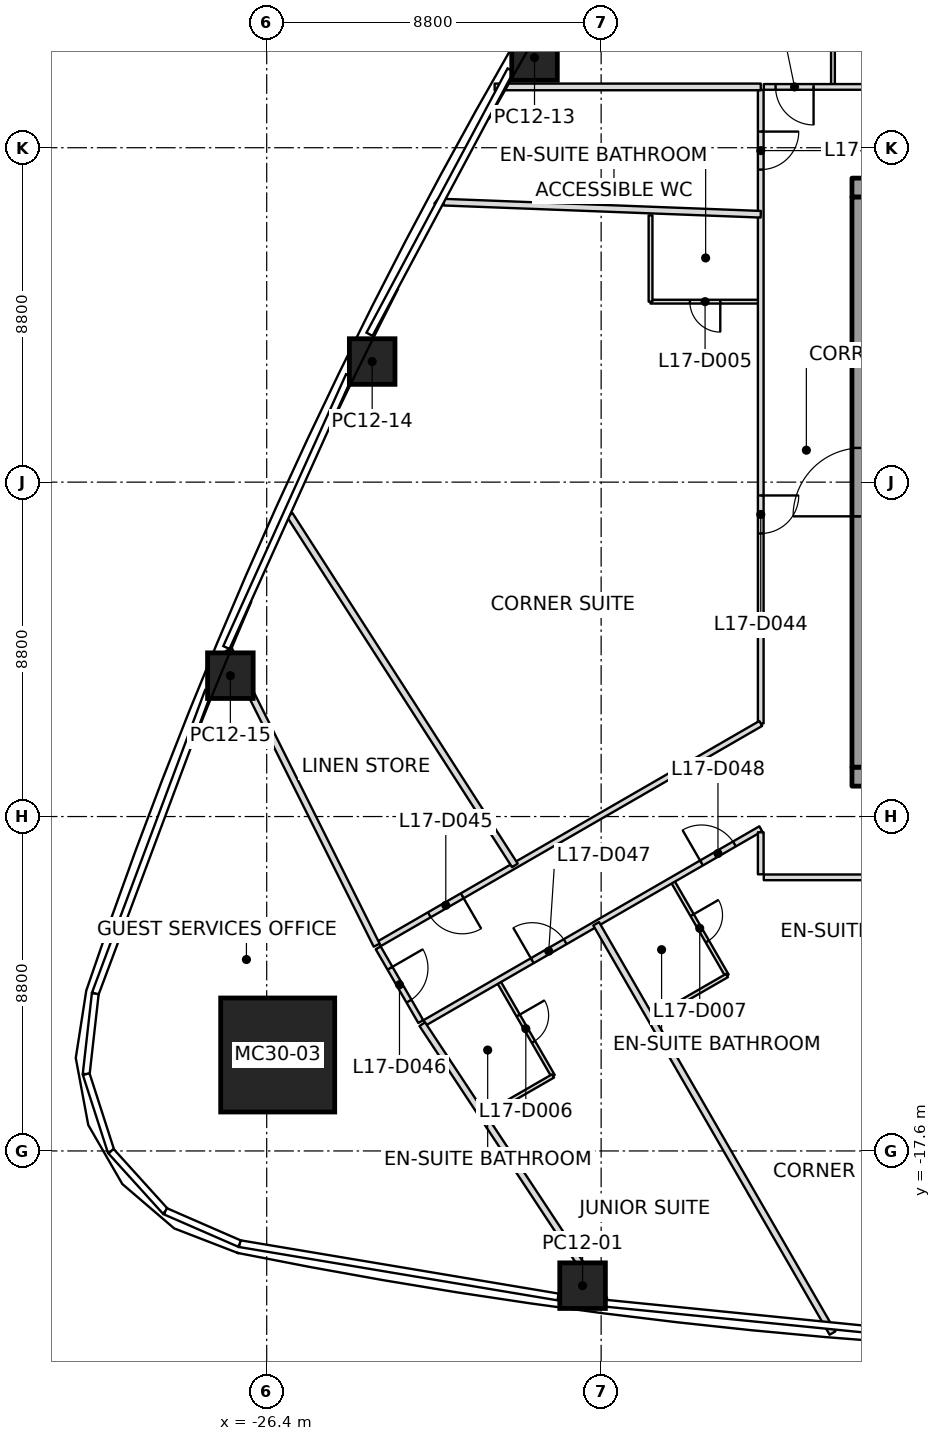
"""IFC4 building model, lengths in metres.
Left out: names, types, materials, properties, quantities, classifications, styles, units other than length and angle.
Written with IfcOpenShell. Run it as: python <this file> out.ifc"""

import sys

from ifc_helpers import new_model, si_unit, direction, frame, frame_2d, origin, origin_2d, place, context, subcontext, project, spatial, rectangle, extrude, element, fill, save


model = new_model("IFC4")
c1 = context("Model", 3, precision=1e-05, world=origin(), true_north=direction((0.0, 1.0)))
c2 = subcontext(c1, "Body", "Model", "MODEL_VIEW")
j1 = project(units=[si_unit("LENGTHUNIT", "METRE"), si_unit("PLANEANGLEUNIT", "RADIAN")], contexts=[c1])
p1 = place(None, origin())
s1 = spatial("IfcSite", under=j1, at=p1, CompositionType="ELEMENT")
p2 = place(p1, origin())
s2 = spatial("IfcBuilding", under=s1, at=p2, CompositionType="ELEMENT")
p3 = place(p2, frame((0.0, 0.0, 85.0)))
s3 = spatial("IfcBuildingStorey", under=s2, at=p3, CompositionType="ELEMENT", Elevation=85.0)
p4 = place(p3, frame((-26.111, -15.075, 0.0), z_axis=(0.030466109479, 0.017607037296, 0.999380712447), x_axis=(0.999535800346, -0.000536667047, -0.03046138236)))
e1 = element("IfcColumn", 1, at=p4, inside=s3, PredefinedType="COLUMN", context=c2, shape_type="SweptSolid", body=[
    extrude(rectangle(XDim=3.0, YDim=3.0, at=origin_2d()), origin(), (0.0, 0.0, 1.0), 3.702),
])
p5 = place(p3, frame((-18.088, -21.145, 0.0), z_axis=(0.019196808933, 0.011346567479, 0.99975133805), x_axis=(-0.991022032909, 0.132545119301, 0.017524886246)))
e2 = element("IfcColumn", 2, at=p5, inside=s3, PredefinedType="COLUMN", context=c2, shape_type="SweptSolid", body=[
    extrude(rectangle(XDim=1.2, YDim=1.2, at=origin_2d()), origin(), (0.0, 0.0, 1.0), 3.701),
])
p6 = place(p3, frame((-19.353, 11.174, 0.0), z_axis=(0.010688725148, -0.006202099777, 0.999923639641), x_axis=(0.499971436973, 0.8660418936, 2.7223042e-05)))
e3 = element("IfcColumn", 3, at=p6, inside=s3, PredefinedType="COLUMN", context=c2, shape_type="SweptSolid", body=[
    extrude(rectangle(XDim=1.2, YDim=1.2, at=origin_2d()), origin(), (0.0, 0.0, 1.0), 3.7),
])
p7 = place(p3, frame((-23.625, 3.173, 0.0), z_axis=(0.015306647086, 0.002243215521, 0.999880330109), x_axis=(0.441416548543, 0.897259444475, -0.008770403192)))
e4 = element("IfcColumn", 4, at=p7, inside=s3, PredefinedType="COLUMN", context=c2, shape_type="SweptSolid", body=[
    extrude(rectangle(XDim=1.2, YDim=1.2, at=origin_2d()), origin(), (0.0, 0.0, 1.0), 3.7),
])
p8 = place(p3, frame((-27.356, -5.093, 0.0), z_axis=(0.019394711647, 0.011016723963, 0.999751207528), x_axis=(0.380922870909, 0.924439738962, -0.017576559581)))
e5 = element("IfcColumn", 5, at=p8, inside=s3, PredefinedType="COLUMN", context=c2, shape_type="SweptSolid", body=[
    extrude(rectangle(XDim=1.2, YDim=1.2, at=origin_2d()), origin(), (0.0, 0.0, 1.0), 3.701),
])
p9 = place(p3, frame((-11.0, -7.75, 0.0), z_axis=(0.0, 0.0, 1.0), x_axis=(1.0, 0.0, 0.0)))
e6 = element("IfcWall", 6, at=p9, inside=s3, PredefinedType="SHEAR", context=c2, shape_type="SweptSolid", body=[
    extrude(rectangle(XDim=22.0, YDim=0.5, at=frame_2d((11.0, 0.0))), origin(), (0.0, 0.0, 1.0), 3.7),
])
p10 = place(p9, frame((10.45, 0.0, 0.0)))
e7 = element("IfcOpeningElement", 7, at=p10, cuts=e6, PredefinedType="OPENING", context=c2, shape_type="SweptSolid", body=[
    extrude(rectangle(XDim=1.1, YDim=2.1, at=frame_2d((0.55, 1.05))), frame((0.0, 0.25, 0.0), z_axis=(0.0, -1.0, 0.0), x_axis=(1.0, 0.0, 0.0)), (0.0, 0.0, 1.0), 0.5),
])
p11 = place(p3, frame((-11.0, 7.75, 0.0), z_axis=(0.0, 0.0, 1.0), x_axis=(1.0, 0.0, 0.0)))
e8 = element("IfcWall", 8, at=p11, inside=s3, PredefinedType="SHEAR", context=c2, shape_type="SweptSolid", body=[
    extrude(rectangle(XDim=22.0, YDim=0.5, at=frame_2d((11.0, 0.0))), origin(), (0.0, 0.0, 1.0), 3.7),
])
p12 = place(p11, frame((10.45, 0.0, 0.0)))
e9 = element("IfcOpeningElement", 9, at=p12, cuts=e8, PredefinedType="OPENING", context=c2, shape_type="SweptSolid", body=[
    extrude(rectangle(XDim=1.1, YDim=2.1, at=frame_2d((0.55, 1.05))), frame((0.0, 0.25, 0.0), z_axis=(0.0, -1.0, 0.0), x_axis=(1.0, 0.0, 0.0)), (0.0, 0.0, 1.0), 0.5),
])
p13 = place(p3, frame((-10.75, -7.5, 0.0), z_axis=(0.0, 0.0, 1.0), x_axis=(0.0, 1.0, 0.0)))
e10 = element("IfcWall", 10, at=p13, inside=s3, PredefinedType="SHEAR", context=c2, shape_type="SweptSolid", body=[
    extrude(rectangle(XDim=15.0, YDim=0.5, at=frame_2d((7.5, 0.0))), origin(), (0.0, 0.0, 1.0), 3.7),
])
p14 = place(p13, frame((6.6, 0.0, 0.0)))
e11 = element("IfcOpeningElement", 11, at=p14, cuts=e10, PredefinedType="OPENING", context=c2, shape_type="SweptSolid", body=[
    extrude(rectangle(XDim=1.8, YDim=2.1, at=frame_2d((0.9, 1.05))), frame((0.0, 0.25, 0.0), z_axis=(0.0, -1.0, 0.0), x_axis=(1.0, 0.0, 0.0)), (0.0, 0.0, 1.0), 0.5),
])
p15 = place(p3, frame((-23.506, -12.186, 0.0), z_axis=(0.0, 0.0, 1.0), x_axis=(-0.447247279783, 0.894410348066, 0.0)))
e12 = element("IfcWall", 12, at=p15, inside=s3, PredefinedType="PARTITIONING", context=c2, shape_type="SweptSolid", body=[
    extrude(rectangle(XDim=8.698, YDim=0.175, at=frame_2d((4.349, 0.0))), origin(), (0.0, 0.0, 1.0), 3.0),
])
p16 = place(p3, frame((-19.869, -10.086, 0.0), z_axis=(0.0, 0.0, 1.0), x_axis=(-0.540525739179, 0.841327478028, 0.0)))
e13 = element("IfcWall", 13, at=p16, inside=s3, PredefinedType="PARTITIONING", context=c2, shape_type="SweptSolid", body=[
    extrude(rectangle(XDim=10.964, YDim=0.175, at=frame_2d((5.482, 0.0))), origin(), (0.0, 0.0, 1.0), 2.934),
])
p17 = place(p3, frame((-17.514, -21.522, 0.0), z_axis=(0.0, 0.0, 1.0), x_axis=(-0.5509763379, 0.834520865571, 0.0)))
e14 = element("IfcWall", 14, at=p17, inside=s3, PredefinedType="PARTITIONING", context=c2, shape_type="SweptSolid", body=[
    extrude(rectangle(XDim=8.697, YDim=0.175, at=frame_2d((4.349, 0.0))), origin(), (0.0, 0.0, 1.0), 3.0),
])
p18 = place(p3, frame((-21.789, 7.281, 0.0), z_axis=(0.0, 0.0, 1.0), x_axis=(-0.768540956149, 0.639800592936, 0.0)))
e15 = element("IfcWall", 15, at=p18, inside=s3, PredefinedType="PARTITIONING", context=c2, shape_type="SweptSolid", body=[
    extrude(rectangle(XDim=0.188, YDim=0.175, at=frame_2d((0.094, 0.0))), origin(), (0.0, 0.0, 1.0), 3.0),
])
p19 = place(p3, frame((-21.739, 7.367, 0.0), z_axis=(0.0, 0.0, 1.0), x_axis=(0.999271981954, -0.038151095432, 0.0)))
e16 = element("IfcWall", 16, at=p19, inside=s3, PredefinedType="PARTITIONING", context=c2, shape_type="SweptSolid", body=[
    extrude(rectangle(XDim=8.345, YDim=0.175, at=frame_2d((4.172, 0.0))), origin(), (0.0, 0.0, 1.0), 2.934),
])
p20 = place(p3, frame((-13.4, 10.4, 0.0), z_axis=(0.0, 0.0, 1.0), x_axis=(-1.0, 0.0, 0.0)))
e17 = element("IfcWall", 17, at=p20, inside=s3, PredefinedType="PARTITIONING", context=c2, shape_type="SweptSolid", body=[
    extrude(rectangle(XDim=7.002, YDim=0.175, at=frame_2d((3.501, 0.0))), origin(), (0.0, 0.0, 1.0), 2.934),
])
p21 = place(p3, frame((-17.73, -11.622, 0.0), z_axis=(0.0, 0.0, 1.0), x_axis=(0.499981892896, -0.866035857673, 0.0)))
e18 = element("IfcWall", 18, at=p21, inside=s3, PredefinedType="PARTITIONING", context=c2, shape_type="SweptSolid", body=[
    extrude(rectangle(XDim=12.436, YDim=0.175, at=frame_2d((6.218, 0.0))), origin(), (0.0, 0.0, 1.0), 2.784),
])
p22 = place(p3, frame((-23.466, -12.255, 0.0), z_axis=(0.0, 0.0, 1.0), x_axis=(0.49994888933, -0.866054910533, 0.0)))
e19 = element("IfcWall", 19, at=p22, inside=s3, PredefinedType="PARTITIONING", context=c2, shape_type="SweptSolid", body=[
    extrude(rectangle(XDim=2.24, YDim=0.15, at=frame_2d((1.12, 0.0))), origin(), (0.0, 0.0, 1.0), 2.797),
])
p23 = place(p22, frame((0.62, 0.0, 0.0)))
e20 = element("IfcOpeningElement", 20, at=p23, cuts=e19, PredefinedType="OPENING", context=c2, shape_type="SweptSolid", body=[
    extrude(rectangle(XDim=1.0, YDim=2.1, at=frame_2d((0.5, 1.05))), frame((0.0, 0.075, 0.0), z_axis=(0.0, -1.0, 0.0), x_axis=(1.0, 0.0, 0.0)), (0.0, 0.0, 1.0), 0.15),
])
p24 = place(p3, frame((-13.4, 10.32, 0.0), z_axis=(0.0, 0.0, 1.0), x_axis=(0.0, -1.0, 0.0)))
e21 = element("IfcWall", 21, at=p24, inside=s3, PredefinedType="PARTITIONING", context=c2, shape_type="SweptSolid", body=[
    extrude(rectangle(XDim=16.671, YDim=0.15, at=frame_2d((8.335, 0.0))), origin(), (0.0, 0.0, 1.0), 2.947),
])
p25 = place(p24, frame((1.095, 0.0, 0.0)))
e22 = element("IfcOpeningElement", 22, at=p25, cuts=e21, PredefinedType="OPENING", context=c2, shape_type="SweptSolid", body=[
    extrude(rectangle(XDim=1.0, YDim=2.1, at=frame_2d((0.5, 1.05))), frame((0.0, 0.075, 0.0), z_axis=(0.0, -1.0, 0.0), x_axis=(1.0, 0.0, 0.0)), (0.0, 0.0, 1.0), 0.15),
])
p26 = place(p24, frame((10.671, 0.0, 0.0)))
e23 = element("IfcOpeningElement", 23, at=p26, cuts=e21, PredefinedType="OPENING", context=c2, shape_type="SweptSolid", body=[
    extrude(rectangle(XDim=1.0, YDim=2.1, at=frame_2d((0.5, 1.05))), frame((0.0, 0.075, 0.0), z_axis=(0.0, -1.0, 0.0), x_axis=(1.0, 0.0, 0.0)), (0.0, 0.0, 1.0), 0.15),
])
p27 = place(p3, frame((-13.4, -6.351, 0.0), z_axis=(0.0, 0.0, 1.0), x_axis=(-0.866025625133, -0.499999616612, 0.0)))
e24 = element("IfcWall", 24, at=p27, inside=s3, PredefinedType="PARTITIONING", context=c2, shape_type="SweptSolid", body=[
    extrude(rectangle(XDim=11.59, YDim=0.15, at=frame_2d((5.795, 0.0))), origin(), (0.0, 0.0, 1.0), 2.947),
])
p28 = place(p27, frame((9.07, 0.0, 0.0)))
e25 = element("IfcOpeningElement", 25, at=p28, cuts=e24, PredefinedType="OPENING", context=c2, shape_type="SweptSolid", body=[
    extrude(rectangle(XDim=1.0, YDim=2.1, at=frame_2d((0.5, 1.05))), frame((0.0, 0.075, 0.0), z_axis=(0.0, -1.0, 0.0), x_axis=(1.0, 0.0, 0.0)), (0.0, 0.0, 1.0), 0.15),
])
p29 = place(p3, frame((-22.237, -14.224, 0.0), z_axis=(0.0, 0.0, 1.0), x_axis=(0.866018645883, 0.500011704846, 0.0)))
e26 = element("IfcWall", 26, at=p29, inside=s3, PredefinedType="PARTITIONING", context=c2, shape_type="SweptSolid", body=[
    extrude(rectangle(XDim=10.204, YDim=0.15, at=frame_2d((5.102, 0.0))), origin(), (0.0, 0.0, 1.0), 2.797),
])
p30 = place(p29, frame((3.262, 0.0, 0.0)))
e27 = element("IfcOpeningElement", 27, at=p30, cuts=e26, PredefinedType="OPENING", context=c2, shape_type="SweptSolid", body=[
    extrude(rectangle(XDim=1.0, YDim=2.1, at=frame_2d((0.5, 1.05))), frame((0.0, 0.075, 0.0), z_axis=(0.0, -1.0, 0.0), x_axis=(1.0, 0.0, 0.0)), (0.0, 0.0, 1.0), 0.15),
])
p31 = place(p29, frame((8.404, 0.0, 0.0)))
e28 = element("IfcOpeningElement", 28, at=p31, cuts=e26, PredefinedType="OPENING", context=c2, shape_type="SweptSolid", body=[
    extrude(rectangle(XDim=1.0, YDim=2.1, at=frame_2d((0.5, 1.05))), frame((0.0, 0.075, 0.0), z_axis=(0.0, -1.0, 0.0), x_axis=(1.0, 0.0, 0.0)), (0.0, 0.0, 1.0), 0.15),
])
p32 = place(p3, frame((-13.4, -9.214, 0.0), z_axis=(0.0, 0.0, 1.0), x_axis=(0.0, -1.0, 0.0)))
e29 = element("IfcWall", 29, at=p32, inside=s3, PredefinedType="PARTITIONING", context=c2, shape_type="SweptSolid", body=[
    extrude(rectangle(XDim=1.106, YDim=0.15, at=frame_2d((0.553, 0.0))), origin(), (0.0, 0.0, 1.0), 2.797),
])
p33 = place(p3, frame((-13.32, -10.4, 0.0), z_axis=(0.0, 0.0, 1.0), x_axis=(1.0, 0.0, 0.0)))
e30 = element("IfcWall", 30, at=p33, inside=s3, PredefinedType="PARTITIONING", context=c2, shape_type="SweptSolid", body=[
    extrude(rectangle(XDim=26.64, YDim=0.15, at=frame_2d((13.32, 0.0))), origin(), (0.0, 0.0, 1.0), 2.797),
])
p34 = place(p33, frame((7.72, 0.0, 0.0)))
e31 = element("IfcOpeningElement", 31, at=p34, cuts=e30, PredefinedType="OPENING", context=c2, shape_type="SweptSolid", body=[
    extrude(rectangle(XDim=1.0, YDim=2.1, at=frame_2d((0.5, 1.05))), frame((0.0, 0.075, 0.0), z_axis=(0.0, -1.0, 0.0), x_axis=(1.0, 0.0, 0.0)), (0.0, 0.0, 1.0), 0.15),
])
p35 = place(p33, frame((11.92, 0.0, 0.0)))
e32 = element("IfcOpeningElement", 32, at=p35, cuts=e30, PredefinedType="OPENING", context=c2, shape_type="SweptSolid", body=[
    extrude(rectangle(XDim=1.0, YDim=2.1, at=frame_2d((0.5, 1.05))), frame((0.0, 0.075, 0.0), z_axis=(0.0, -1.0, 0.0), x_axis=(1.0, 0.0, 0.0)), (0.0, 0.0, 1.0), 0.15),
])
p36 = place(p33, frame((16.52, 0.0, 0.0)))
e33 = element("IfcOpeningElement", 33, at=p36, cuts=e30, PredefinedType="OPENING", context=c2, shape_type="SweptSolid", body=[
    extrude(rectangle(XDim=1.0, YDim=2.1, at=frame_2d((0.5, 1.05))), frame((0.0, 0.075, 0.0), z_axis=(0.0, -1.0, 0.0), x_axis=(1.0, 0.0, 0.0)), (0.0, 0.0, 1.0), 0.15),
])
p37 = place(p33, frame((21.12, 0.0, 0.0)))
e34 = element("IfcOpeningElement", 34, at=p37, cuts=e30, PredefinedType="OPENING", context=c2, shape_type="SweptSolid", body=[
    extrude(rectangle(XDim=1.0, YDim=2.1, at=frame_2d((0.5, 1.05))), frame((0.0, 0.075, 0.0), z_axis=(0.0, -1.0, 0.0), x_axis=(1.0, 0.0, 0.0)), (0.0, 0.0, 1.0), 0.15),
])
p38 = place(p3, frame((-5.08, 10.4, 0.0), z_axis=(0.0, 0.0, 1.0), x_axis=(-1.0, 0.0, 0.0)))
e35 = element("IfcWall", 35, at=p38, inside=s3, PredefinedType="PARTITIONING", context=c2, shape_type="SweptSolid", body=[
    extrude(rectangle(XDim=8.24, YDim=0.15, at=frame_2d((4.12, 0.0))), origin(), (0.0, 0.0, 1.0), 2.947),
])
p39 = place(p38, frame((6.93, 0.0, 0.0)))
e36 = element("IfcOpeningElement", 36, at=p39, cuts=e35, PredefinedType="OPENING", context=c2, shape_type="SweptSolid", body=[
    extrude(rectangle(XDim=1.0, YDim=2.1, at=frame_2d((0.5, 1.05))), frame((0.0, 0.075, 0.0), z_axis=(0.0, -1.0, 0.0), x_axis=(1.0, 0.0, 0.0)), (0.0, 0.0, 1.0), 0.15),
])
p40 = place(p3, frame((-20.3, -13.14, 0.0), z_axis=(0.0, 0.0, 1.0), x_axis=(0.499999802827, -0.866025517622, 0.0)))
e37 = element("IfcWall", 37, at=p40, inside=s3, PredefinedType="PARTITIONING", context=c2, shape_type="SweptSolid", body=[
    extrude(rectangle(XDim=2.87, YDim=0.1, at=frame_2d((1.435, 0.0))), origin(), (0.0, 0.0, 1.0), 3.0),
])
p41 = place(p40, frame((1.035, 0.0, 0.0)))
e38 = element("IfcOpeningElement", 38, at=p41, cuts=e37, PredefinedType="OPENING", context=c2, shape_type="SweptSolid", body=[
    extrude(rectangle(XDim=0.8, YDim=2.1, at=frame_2d((0.4, 1.05))), frame((0.0, 0.05, 0.0), z_axis=(0.0, -1.0, 0.0), x_axis=(1.0, 0.0, 0.0)), (0.0, 0.0, 1.0), 0.1),
])
p42 = place(p3, frame((-18.865, -15.626, 0.0), z_axis=(0.0, 0.0, 1.0), x_axis=(-0.866017224141, -0.500014167291, 0.0)))
e39 = element("IfcWall", 39, at=p42, inside=s3, PredefinedType="PARTITIONING", context=c2, shape_type="SweptSolid", body=[
    extrude(rectangle(XDim=2.27, YDim=0.1, at=frame_2d((1.135, 0.0))), origin(), (0.0, 0.0, 1.0), 3.0),
])
p43 = place(p3, frame((-13.43, 4.749, 0.0), z_axis=(0.0, 0.0, 1.0), x_axis=(-1.0, 0.0, 0.0)))
e40 = element("IfcWall", 40, at=p43, inside=s3, PredefinedType="PARTITIONING", context=c2, shape_type="SweptSolid", body=[
    extrude(rectangle(XDim=2.87, YDim=0.1, at=frame_2d((1.435, 0.0))), origin(), (0.0, 0.0, 1.0), 3.0),
])
p44 = place(p43, frame((1.035, 0.0, 0.0)))
e41 = element("IfcOpeningElement", 41, at=p44, cuts=e40, PredefinedType="OPENING", context=c2, shape_type="SweptSolid", body=[
    extrude(rectangle(XDim=0.8, YDim=2.1, at=frame_2d((0.4, 1.05))), frame((0.0, 0.05, 0.0), z_axis=(0.0, -1.0, 0.0), x_axis=(1.0, 0.0, 0.0)), (0.0, 0.0, 1.0), 0.1),
])
p45 = place(p3, frame((-16.3, 4.749, 0.0), z_axis=(0.0, 0.0, 1.0), x_axis=(0.0, 1.0, 0.0)))
e42 = element("IfcWall", 42, at=p45, inside=s3, PredefinedType="PARTITIONING", context=c2, shape_type="SweptSolid", body=[
    extrude(rectangle(XDim=2.27, YDim=0.1, at=frame_2d((1.135, 0.0))), origin(), (0.0, 0.0, 1.0), 3.0),
])
p46 = place(p3, frame((-15.723, -10.498, 0.0), z_axis=(0.0, 0.0, 1.0), x_axis=(0.499999802827, -0.866025517622, 0.0)))
e43 = element("IfcWall", 43, at=p46, inside=s3, PredefinedType="PARTITIONING", context=c2, shape_type="SweptSolid", body=[
    extrude(rectangle(XDim=2.87, YDim=0.1, at=frame_2d((1.435, 0.0))), origin(), (0.0, 0.0, 1.0), 2.797),
])
p47 = place(p46, frame((1.035, 0.0, 0.0)))
e44 = element("IfcOpeningElement", 44, at=p47, cuts=e43, PredefinedType="OPENING", context=c2, shape_type="SweptSolid", body=[
    extrude(rectangle(XDim=0.8, YDim=2.1, at=frame_2d((0.4, 1.05))), frame((0.0, 0.05, 0.0), z_axis=(0.0, -1.0, 0.0), x_axis=(1.0, 0.0, 0.0)), (0.0, 0.0, 1.0), 0.1),
])
p48 = place(p3, frame((-14.288, -12.984, 0.0), z_axis=(0.0, 0.0, 1.0), x_axis=(-0.866017224141, -0.500014167291, 0.0)))
e45 = element("IfcWall", 45, at=p48, inside=s3, PredefinedType="PARTITIONING", context=c2, shape_type="SweptSolid", body=[
    extrude(rectangle(XDim=2.27, YDim=0.1, at=frame_2d((1.135, 0.0))), origin(), (0.0, 0.0, 1.0), 2.943),
])
p49 = place(p3, frame((-11.5, 10.43, 0.0), z_axis=(0.0, 0.0, 1.0), x_axis=(0.0, 1.0, 0.0)))
e46 = element("IfcWall", 46, at=p49, inside=s3, PredefinedType="PARTITIONING", context=c2, shape_type="SweptSolid", body=[
    extrude(rectangle(XDim=2.87, YDim=0.1, at=frame_2d((1.435, 0.0))), origin(), (0.0, 0.0, 1.0), 2.947),
])
p50 = place(p49, frame((1.035, 0.0, 0.0)))
e47 = element("IfcOpeningElement", 47, at=p50, cuts=e46, PredefinedType="OPENING", context=c2, shape_type="SweptSolid", body=[
    extrude(rectangle(XDim=0.8, YDim=2.1, at=frame_2d((0.4, 1.05))), frame((0.0, 0.05, 0.0), z_axis=(0.0, -1.0, 0.0), x_axis=(1.0, 0.0, 0.0)), (0.0, 0.0, 1.0), 0.1),
])
p51 = place(p39, origin())
e48 = element("IfcDoor", 48, at=p51, inside=s3, OperationType="SINGLE_SWING_RIGHT", PredefinedType="DOOR", context=c2, shape_type="SweptSolid", body=[
    extrude(rectangle(XDim=1.0, YDim=2.1, at=frame_2d((0.5, 1.05))), frame((0.0, 0.025, 0.0), z_axis=(0.0, -1.0, 0.0), x_axis=(1.0, 0.0, 0.0)), (0.0, 0.0, 1.0), 0.05),
])
fill(e36, e48)
p52 = place(p25, origin())
e49 = element("IfcDoor", 49, at=p52, inside=s3, OperationType="SINGLE_SWING_LEFT", PredefinedType="DOOR", context=c2, shape_type="SweptSolid", body=[
    extrude(rectangle(XDim=1.0, YDim=2.1, at=frame_2d((0.5, 1.05))), frame((0.0, 0.025, 0.0), z_axis=(0.0, -1.0, 0.0), x_axis=(1.0, 0.0, 0.0)), (0.0, 0.0, 1.0), 0.05),
])
fill(e22, e49)
p53 = place(p26, origin())
e50 = element("IfcDoor", 50, at=p53, inside=s3, OperationType="SINGLE_SWING_RIGHT", PredefinedType="DOOR", context=c2, shape_type="SweptSolid", body=[
    extrude(rectangle(XDim=1.0, YDim=2.1, at=frame_2d((0.5, 1.05))), frame((0.0, 0.025, 0.0), z_axis=(0.0, -1.0, 0.0), x_axis=(1.0, 0.0, 0.0)), (0.0, 0.0, 1.0), 0.05),
])
fill(e23, e50)
p54 = place(p44, origin())
e51 = element("IfcDoor", 51, at=p54, inside=s3, OperationType="SINGLE_SWING_LEFT", PredefinedType="DOOR", context=c2, shape_type="SweptSolid", body=[
    extrude(rectangle(XDim=0.8, YDim=2.1, at=frame_2d((0.4, 1.05))), frame((0.0, 0.025, 0.0), z_axis=(0.0, -1.0, 0.0), x_axis=(1.0, 0.0, 0.0)), (0.0, 0.0, 1.0), 0.05),
])
fill(e41, e51)
p55 = place(p28, origin())
e52 = element("IfcDoor", 52, at=p55, inside=s3, OperationType="SINGLE_SWING_LEFT", PredefinedType="DOOR", context=c2, shape_type="SweptSolid", body=[
    extrude(rectangle(XDim=1.0, YDim=2.1, at=frame_2d((0.5, 1.05))), frame((0.0, 0.025, 0.0), z_axis=(0.0, -1.0, 0.0), x_axis=(1.0, 0.0, 0.0)), (0.0, 0.0, 1.0), 0.05),
])
fill(e25, e52)
p56 = place(p23, origin())
e53 = element("IfcDoor", 53, at=p56, inside=s3, OperationType="SINGLE_SWING_RIGHT", PredefinedType="DOOR", context=c2, shape_type="SweptSolid", body=[
    extrude(rectangle(XDim=1.0, YDim=2.1, at=frame_2d((0.5, 1.05))), frame((0.0, 0.025, 0.0), z_axis=(0.0, -1.0, 0.0), x_axis=(1.0, 0.0, 0.0)), (0.0, 0.0, 1.0), 0.05),
])
fill(e20, e53)
p57 = place(p30, origin())
e54 = element("IfcDoor", 54, at=p57, inside=s3, OperationType="SINGLE_SWING_LEFT", PredefinedType="DOOR", context=c2, shape_type="SweptSolid", body=[
    extrude(rectangle(XDim=1.0, YDim=2.1, at=frame_2d((0.5, 1.05))), frame((0.0, 0.025, 0.0), z_axis=(0.0, -1.0, 0.0), x_axis=(1.0, 0.0, 0.0)), (0.0, 0.0, 1.0), 0.05),
])
fill(e27, e54)
p58 = place(p41, origin())
e55 = element("IfcDoor", 55, at=p58, inside=s3, OperationType="SINGLE_SWING_LEFT", PredefinedType="DOOR", context=c2, shape_type="SweptSolid", body=[
    extrude(rectangle(XDim=0.8, YDim=2.1, at=frame_2d((0.4, 1.05))), frame((0.0, 0.025, 0.0), z_axis=(0.0, -1.0, 0.0), x_axis=(1.0, 0.0, 0.0)), (0.0, 0.0, 1.0), 0.05),
])
fill(e38, e55)
p59 = place(p31, origin())
e56 = element("IfcDoor", 56, at=p59, inside=s3, OperationType="SINGLE_SWING_LEFT", PredefinedType="DOOR", context=c2, shape_type="SweptSolid", body=[
    extrude(rectangle(XDim=1.0, YDim=2.1, at=frame_2d((0.5, 1.05))), frame((0.0, 0.025, 0.0), z_axis=(0.0, -1.0, 0.0), x_axis=(1.0, 0.0, 0.0)), (0.0, 0.0, 1.0), 0.05),
])
fill(e28, e56)
p60 = place(p47, origin())
e57 = element("IfcDoor", 57, at=p60, inside=s3, OperationType="SINGLE_SWING_RIGHT", PredefinedType="DOOR", context=c2, shape_type="SweptSolid", body=[
    extrude(rectangle(XDim=0.8, YDim=2.1, at=frame_2d((0.4, 1.05))), frame((0.0, 0.025, 0.0), z_axis=(0.0, -1.0, 0.0), x_axis=(1.0, 0.0, 0.0)), (0.0, 0.0, 1.0), 0.05),
])
fill(e44, e57)
p61 = place(p14, origin())
e58 = element("IfcDoor", 58, at=p61, inside=s3, OperationType="DOUBLE_DOOR_SINGLE_SWING", PredefinedType="DOOR", context=c2, shape_type="SweptSolid", body=[
    extrude(rectangle(XDim=1.8, YDim=2.1, at=frame_2d((0.9, 1.05))), frame((0.0, 0.025, 0.0), z_axis=(0.0, -1.0, 0.0), x_axis=(1.0, 0.0, 0.0)), (0.0, 0.0, 1.0), 0.05),
])
fill(e11, e58)
save(model, sys.argv[1])
